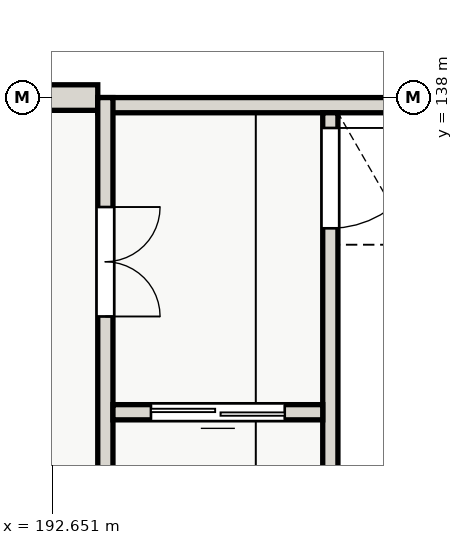
"""IFC4 building model, lengths in metres.
Left out: names, types, materials, properties, quantities, classifications, styles, units other than length and angle.
Written with IfcOpenShell. Run it as: python <this file> out.ifc"""

import sys

from ifc_helpers import new_model, si_unit, direction, frame, frame_2d, origin, place, context, subcontext, project, spatial, rectangle, extrude, element, fill, save


model = new_model("IFC4")
c1 = context("Model", 3, precision=1e-05, world=origin(), true_north=direction((0.0, 1.0)))
c2 = subcontext(c1, "Body", "Model", "MODEL_VIEW")
j1 = project(units=[si_unit("LENGTHUNIT", "METRE"), si_unit("PLANEANGLEUNIT", "RADIAN")], contexts=[c1])
p1 = place(None, origin())
s1 = spatial("IfcSite", under=j1, at=p1, CompositionType="ELEMENT")
p2 = place(p1, origin())
s2 = spatial("IfcBuilding", under=s1, at=p2, CompositionType="ELEMENT")
p3 = place(p2, frame((0.0, 0.0, 12.6)))
s3 = spatial("IfcBuildingStorey", under=s2, at=p3, CompositionType="ELEMENT", Elevation=12.6)
p4 = place(p3, frame((192.0, 138.0, 0.0), z_axis=(0.0, 0.0, 1.0), x_axis=(1.0, 0.0, 0.0)))
e1 = element("IfcWall", 1, at=p4, inside=s3, PredefinedType="SOLIDWALL", context=c2, shape_type="SweptSolid", body=[
    extrude(rectangle(XDim=1.4, YDim=0.42, at=frame_2d((0.7, 0.0))), origin(), (0.0, 0.0, 1.0), 3.57),
])
p5 = place(p3, frame((193.4, 137.875, 0.0), z_axis=(0.0, 0.0, 1.0), x_axis=(1.0, 0.0, 0.0)))
e2 = element("IfcWall", 2, at=p5, inside=s3, PredefinedType="SHEAR", context=c2, shape_type="SweptSolid", body=[
    extrude(rectangle(XDim=9.2, YDim=0.25, at=frame_2d((4.6, 0.0))), origin(), (0.0, 0.0, 1.0), 5.6),
])
p6 = place(p3, frame((193.525, 138.0, 0.0), z_axis=(0.0, 0.0, 1.0), x_axis=(0.0, -1.0, 0.0)))
e3 = element("IfcWall", 3, at=p6, inside=s3, PredefinedType="SHEAR", context=c2, shape_type="SweptSolid", body=[
    extrude(rectangle(XDim=9.2, YDim=0.25, at=frame_2d((4.6, 0.0))), origin(), (0.0, 0.0, 1.0), 5.6),
])
p7 = place(p6, frame((1.8, 0.0, 0.0)))
e4 = element("IfcOpeningElement", 4, at=p7, cuts=e3, PredefinedType="OPENING", context=c2, shape_type="SweptSolid", body=[
    extrude(rectangle(XDim=1.8, YDim=2.15, at=frame_2d((0.9, 1.075))), frame((0.0, 0.135, 0.0), z_axis=(0.0, -1.0, 0.0), x_axis=(1.0, 0.0, 0.0)), (0.0, 0.0, 1.0), 0.27),
])
p8 = place(p3, frame((197.225, 137.75, 0.0), z_axis=(0.0, 0.0, 1.0), x_axis=(0.0, -1.0, 0.0)))
e5 = element("IfcWall", 5, at=p8, inside=s3, PredefinedType="SHEAR", context=c2, shape_type="SweptSolid", body=[
    extrude(rectangle(XDim=8.7, YDim=0.25, at=frame_2d((4.35, 0.0))), origin(), (0.0, 0.0, 1.0), 5.6),
])
p9 = place(p8, frame((0.25, 0.0, 0.0)))
e6 = element("IfcOpeningElement", 6, at=p9, cuts=e5, PredefinedType="OPENING", context=c2, shape_type="SweptSolid", body=[
    extrude(rectangle(XDim=1.65, YDim=2.1, at=frame_2d((0.825, 1.05))), frame((0.0, 0.135, 0.0), z_axis=(0.0, -1.0, 0.0), x_axis=(1.0, 0.0, 0.0)), (0.0, 0.0, 1.0), 0.27),
])
p10 = place(p3, frame((197.1, 132.825, 0.0), z_axis=(0.0, 0.0, 1.0), x_axis=(-1.0, 0.0, 0.0)))
e7 = element("IfcWall", 7, at=p10, inside=s3, PredefinedType="SHEAR", context=c2, shape_type="SweptSolid", body=[
    extrude(rectangle(XDim=3.45, YDim=0.25, at=frame_2d((1.725, 0.0))), origin(), (0.0, 0.0, 1.0), 5.6),
])
p11 = place(p10, frame((0.625, 0.0, 0.0)))
e8 = element("IfcOpeningElement", 8, at=p11, cuts=e7, PredefinedType="OPENING", context=c2, shape_type="SweptSolid", body=[
    extrude(rectangle(XDim=2.2, YDim=2.35, at=frame_2d((1.1, 1.175))), frame((0.0, 0.135, 0.0), z_axis=(0.0, -1.0, 0.0), x_axis=(1.0, 0.0, 0.0)), (0.0, 0.0, 1.0), 0.27),
])
p12 = place(p7, origin())
e9 = element("IfcDoor", 9, at=p12, inside=s3, OperationType="DOUBLE_DOOR_SINGLE_SWING", PredefinedType="DOOR", context=c2, shape_type="SweptSolid", body=[
    extrude(rectangle(XDim=1.8, YDim=2.15, at=frame_2d((0.9, 1.075))), frame((0.0, 0.025, 0.0), z_axis=(0.0, -1.0, 0.0), x_axis=(1.0, 0.0, 0.0)), (0.0, 0.0, 1.0), 0.05),
])
fill(e4, e9)
p13 = place(p9, origin())
e10 = element("IfcDoor", 10, at=p13, inside=s3, OperationType="SINGLE_SWING_LEFT", PredefinedType="DOOR", context=c2, shape_type="SweptSolid", body=[
    extrude(rectangle(XDim=1.65, YDim=2.1, at=frame_2d((0.825, 1.05))), frame((0.0, 0.025, 0.0), z_axis=(0.0, -1.0, 0.0), x_axis=(1.0, 0.0, 0.0)), (0.0, 0.0, 1.0), 0.05),
])
fill(e6, e10)
p14 = place(p11, origin())
e11 = element("IfcDoor", 11, at=p14, inside=s3, OperationType="SLIDING_TO_RIGHT", PredefinedType="DOOR", context=c2, shape_type="SweptSolid", body=[
    extrude(rectangle(XDim=2.2, YDim=2.35, at=frame_2d((1.1, 1.175))), frame((0.0, 0.025, 0.0), z_axis=(0.0, -1.0, 0.0), x_axis=(1.0, 0.0, 0.0)), (0.0, 0.0, 1.0), 0.05),
])
fill(e8, e11)
save(model, sys.argv[1])
